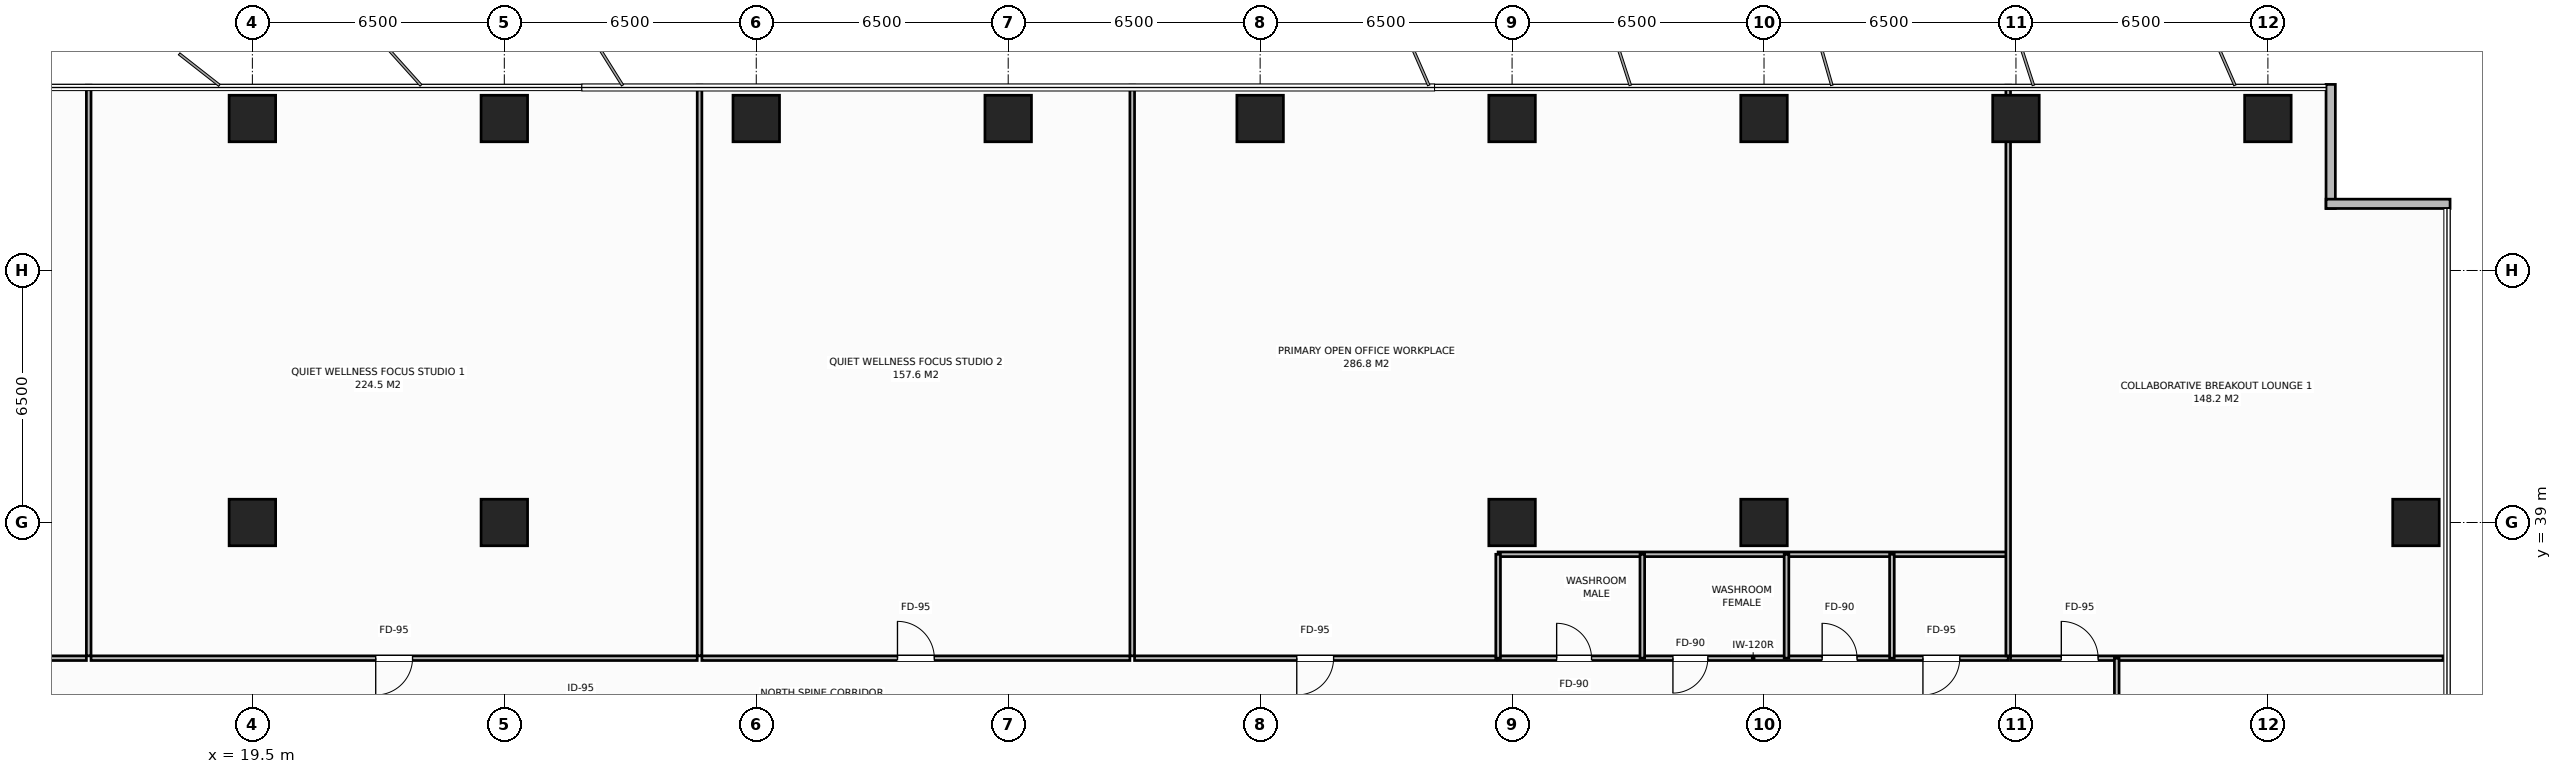
"""IFC4 building model, lengths in metres.
Left out: names, types, materials, properties, quantities, classifications, styles, units other than length and angle.
Written with IfcOpenShell. Run it as: python <this file> out.ifc"""

import sys

from ifc_helpers import new_model, si_unit, direction, frame, frame_2d, origin, origin_2d, place, context, subcontext, project, spatial, rectangle, extrude, element, fill, save


model = new_model("IFC4")
c1 = context("Model", 3, precision=1e-05, world=origin(), true_north=direction((0.0, 1.0)))
c2 = subcontext(c1, "Body", "Model", "MODEL_VIEW")
j1 = project(units=[si_unit("LENGTHUNIT", "METRE"), si_unit("PLANEANGLEUNIT", "RADIAN")], contexts=[c1])
p1 = place(None, origin())
s1 = spatial("IfcSite", under=j1, at=p1, CompositionType="ELEMENT")
p2 = place(p1, origin())
s2 = spatial("IfcBuilding", under=s1, at=p2, CompositionType="ELEMENT")
p3 = place(p2, frame((0.0, 0.0, 89.8)))
s3 = spatial("IfcBuildingStorey", under=s2, at=p3, CompositionType="ELEMENT", Elevation=89.8)
for number, where, z_axis, x_axis in (
    (1, (19.5, 39.0, 0.0), (0.0, 0.0, 1.0), (1.0, 0.0, 0.0)),
    (2, (58.5, 39.0, 0.0), (0.0, 0.0, 1.0), (1.0, 0.0, 0.0)),
    (3, (26.0, 39.0, 0.0), (0.0, 0.0, 1.0), (1.0, 0.0, 0.0)),
    (4, (52.0, 39.0, 0.0), (0.0, 0.0, 1.0), (1.0, 0.0, 0.0)),
    (5, (19.5, 49.42, 0.0), (0.0, 0.0, 1.0), (1.0, 0.0, 0.0)),
    (6, (26.0, 49.42, 0.0), (0.0, 0.0, 1.0), (1.0, 0.0, 0.0)),
    (7, (32.5, 49.42, 0.0), (0.0, 0.0, 1.0), (1.0, 0.0, 0.0)),
    (8, (39.0, 49.42, 0.0), (0.0, 0.0, 1.0), (1.0, 0.0, 0.0)),
    (9, (45.5, 49.42, 0.0), (0.0, 0.0, 1.0), (1.0, 0.0, 0.0)),
    (10, (52.0, 49.42, 0.0), (0.0, 0.0, 1.0), (1.0, 0.0, 0.0)),
    (11, (58.5, 49.42, 0.0), (0.0, 0.0, 1.0), (1.0, 0.0, 0.0)),
    (12, (65.0, 49.42, 0.0), (0.0, 0.0, 1.0), (1.0, 0.0, 0.0)),
    (13, (71.5, 49.42, 0.0), (0.0, 0.0, 1.0), (1.0, 0.0, 0.0)),
    (14, (75.32, 39.0, 0.0), (0.0, 0.0, 1.0), (1.0, 0.0, 0.0)),
):
    element("IfcColumn", number, at=place(p3, frame(where, z_axis=z_axis, x_axis=x_axis)), inside=s3, PredefinedType="COLUMN", context=c2, shape_type="SweptSolid", body=[
        extrude(rectangle(XDim=1.2, YDim=1.2, at=origin_2d()), origin(), (0.0, 0.0, 1.0), 3.8),
    ])
for number, where, z_axis, x_axis in (
    (15, (73.12, 50.3, 0.0), (0.0, 0.0, 1.0), (0.0, -1.0, 0.0)),
    (16, (73.0, 47.22, 0.0), (0.0, 0.0, 1.0), (1.0, 0.0, 0.0)),
):
    element("IfcWall", number, at=place(p3, frame(where, z_axis=z_axis, x_axis=x_axis)), inside=s3, PredefinedType="STANDARD", context=c2, shape_type="SweptSolid", body=[
        extrude(rectangle(XDim=3.2, YDim=0.24, at=frame_2d((1.6, 0.0))), origin(), (0.0, 0.0, 1.0), 3.565),
    ])
p4 = place(p3, frame((51.64, 35.5, 0.0), z_axis=(0.0, 0.0, 1.0), x_axis=(1.0, 0.0, 0.0)))
e17 = element("IfcWall", 17, at=p4, inside=s3, PredefinedType="PARTITIONING", context=c2, shape_type="SweptSolid", body=[
    extrude(rectangle(XDim=13.16, YDim=0.12, at=frame_2d((6.58, 0.0))), origin(), (0.0, 0.0, 1.0), 3.565),
])
p5 = place(p4, frame((1.51, 0.0, 0.0)))
e18 = element("IfcOpeningElement", 18, at=p5, cuts=e17, PredefinedType="OPENING", context=c2, shape_type="SweptSolid", body=[
    extrude(rectangle(XDim=0.9, YDim=2.15, at=frame_2d((0.45, 1.075))), frame((0.0, 0.07, 0.0), z_axis=(0.0, -1.0, 0.0), x_axis=(1.0, 0.0, 0.0)), (0.0, 0.0, 1.0), 0.14),
])
p6 = place(p4, frame((4.51, 0.0, 0.0)))
e19 = element("IfcOpeningElement", 19, at=p6, cuts=e17, PredefinedType="OPENING", context=c2, shape_type="SweptSolid", body=[
    extrude(rectangle(XDim=0.9, YDim=2.15, at=frame_2d((0.45, 1.075))), frame((0.0, 0.07, 0.0), z_axis=(0.0, -1.0, 0.0), x_axis=(1.0, 0.0, 0.0)), (0.0, 0.0, 1.0), 0.14),
])
p7 = place(p4, frame((8.36, 0.0, 0.0)))
e20 = element("IfcOpeningElement", 20, at=p7, cuts=e17, PredefinedType="OPENING", context=c2, shape_type="SweptSolid", body=[
    extrude(rectangle(XDim=0.9, YDim=2.15, at=frame_2d((0.45, 1.075))), frame((0.0, 0.07, 0.0), z_axis=(0.0, -1.0, 0.0), x_axis=(1.0, 0.0, 0.0)), (0.0, 0.0, 1.0), 0.14),
])
p8 = place(p4, frame((10.96, 0.0, 0.0)))
e21 = element("IfcOpeningElement", 21, at=p8, cuts=e17, PredefinedType="OPENING", context=c2, shape_type="SweptSolid", body=[
    extrude(rectangle(XDim=0.95, YDim=2.15, at=frame_2d((0.475, 1.075))), frame((0.0, 0.07, 0.0), z_axis=(0.0, -1.0, 0.0), x_axis=(1.0, 0.0, 0.0)), (0.0, 0.0, 1.0), 0.14),
])
p9 = place(p3, frame((51.64, 38.18, 0.0), z_axis=(0.0, 0.0, 1.0), x_axis=(1.0, 0.0, 0.0)))
e22 = element("IfcWall", 22, at=p9, inside=s3, PredefinedType="PARTITIONING", context=c2, shape_type="SweptSolid", body=[
    extrude(rectangle(XDim=13.16, YDim=0.12, at=frame_2d((6.58, 0.0))), origin(), (0.0, 0.0, 1.0), 3.565),
])
for number, where, z_axis, x_axis in (
    (23, (51.64, 35.5, 0.0), (0.0, 0.0, 1.0), (0.0, 1.0, 0.0)),
    (24, (55.36, 35.5, 0.0), (0.0, 0.0, 1.0), (0.0, 1.0, 0.0)),
    (25, (59.08, 35.5, 0.0), (0.0, 0.0, 1.0), (0.0, 1.0, 0.0)),
    (26, (61.8, 35.5, 0.0), (0.0, 0.0, 1.0), (0.0, 1.0, 0.0)),
):
    element("IfcWall", number, at=place(p3, frame(where, z_axis=z_axis, x_axis=x_axis)), inside=s3, PredefinedType="PARTITIONING", context=c2, shape_type="SweptSolid", body=[
        extrude(rectangle(XDim=2.68, YDim=0.12, at=frame_2d((1.34, 0.0))), origin(), (0.0, 0.0, 1.0), 3.565),
    ])
p10 = place(p3, frame((15.277, 35.56, 0.0), z_axis=(0.0, 0.0, 1.0), x_axis=(0.0, 1.0, 0.0)))
e27 = element("IfcWall", 27, at=p10, inside=s3, PredefinedType="PARTITIONING", context=c2, shape_type="SweptSolid", body=[
    extrude(rectangle(XDim=14.72, YDim=0.12, at=frame_2d((7.36, 0.0))), origin(), (0.0, 0.0, 1.0), 3.565),
])
p11 = place(p3, frame((1.98, 35.5, 0.0), z_axis=(0.0, 0.0, 1.0), x_axis=(1.0, 0.0, 0.0)))
e28 = element("IfcWall", 28, at=p11, inside=s3, PredefinedType="PARTITIONING", context=c2, shape_type="SweptSolid", body=[
    extrude(rectangle(XDim=13.237, YDim=0.12, at=frame_2d((6.619, 0.0))), origin(), (0.0, 0.0, 1.0), 3.565),
])
p12 = place(p11, frame((8.9, 0.0, 0.0)))
e29 = element("IfcOpeningElement", 29, at=p12, cuts=e28, PredefinedType="OPENING", context=c2, shape_type="SweptSolid", body=[
    extrude(rectangle(XDim=0.95, YDim=2.15, at=frame_2d((0.475, 1.075))), frame((0.0, 0.07, 0.0), z_axis=(0.0, -1.0, 0.0), x_axis=(1.0, 0.0, 0.0)), (0.0, 0.0, 1.0), 0.14),
])
p13 = place(p3, frame((31.037, 35.56, 0.0), z_axis=(0.0, 0.0, 1.0), x_axis=(0.0, 1.0, 0.0)))
e30 = element("IfcWall", 30, at=p13, inside=s3, PredefinedType="PARTITIONING", context=c2, shape_type="SweptSolid", body=[
    extrude(rectangle(XDim=14.72, YDim=0.12, at=frame_2d((7.36, 0.0))), origin(), (0.0, 0.0, 1.0), 3.565),
])
p14 = place(p3, frame((15.337, 35.5, 0.0), z_axis=(0.0, 0.0, 1.0), x_axis=(1.0, 0.0, 0.0)))
e31 = element("IfcWall", 31, at=p14, inside=s3, PredefinedType="PARTITIONING", context=c2, shape_type="SweptSolid", body=[
    extrude(rectangle(XDim=15.64, YDim=0.12, at=frame_2d((7.82, 0.0))), origin(), (0.0, 0.0, 1.0), 3.565),
])
p15 = place(p14, frame((7.345, 0.0, 0.0)))
e32 = element("IfcOpeningElement", 32, at=p15, cuts=e31, PredefinedType="OPENING", context=c2, shape_type="SweptSolid", body=[
    extrude(rectangle(XDim=0.95, YDim=2.15, at=frame_2d((0.475, 1.075))), frame((0.0, 0.07, 0.0), z_axis=(0.0, -1.0, 0.0), x_axis=(1.0, 0.0, 0.0)), (0.0, 0.0, 1.0), 0.14),
])
p16 = place(p3, frame((42.2, 35.56, 0.0), z_axis=(0.0, 0.0, 1.0), x_axis=(0.0, 1.0, 0.0)))
e33 = element("IfcWall", 33, at=p16, inside=s3, PredefinedType="PARTITIONING", context=c2, shape_type="SweptSolid", body=[
    extrude(rectangle(XDim=14.72, YDim=0.12, at=frame_2d((7.36, 0.0))), origin(), (0.0, 0.0, 1.0), 3.565),
])
p17 = place(p3, frame((31.097, 35.5, 0.0), z_axis=(0.0, 0.0, 1.0), x_axis=(1.0, 0.0, 0.0)))
e34 = element("IfcWall", 34, at=p17, inside=s3, PredefinedType="PARTITIONING", context=c2, shape_type="SweptSolid", body=[
    extrude(rectangle(XDim=11.043, YDim=0.12, at=frame_2d((5.521, 0.0))), origin(), (0.0, 0.0, 1.0), 3.565),
])
p18 = place(p17, frame((5.046, 0.0, 0.0)))
e35 = element("IfcOpeningElement", 35, at=p18, cuts=e34, PredefinedType="OPENING", context=c2, shape_type="SweptSolid", body=[
    extrude(rectangle(XDim=0.95, YDim=2.15, at=frame_2d((0.475, 1.075))), frame((0.0, 0.07, 0.0), z_axis=(0.0, -1.0, 0.0), x_axis=(1.0, 0.0, 0.0)), (0.0, 0.0, 1.0), 0.14),
])
p19 = place(p3, frame((64.8, 35.56, 0.0), z_axis=(0.0, 0.0, 1.0), x_axis=(0.0, 1.0, 0.0)))
e36 = element("IfcWall", 36, at=p19, inside=s3, PredefinedType="PARTITIONING", context=c2, shape_type="SweptSolid", body=[
    extrude(rectangle(XDim=14.72, YDim=0.12, at=frame_2d((7.36, 0.0))), origin(), (0.0, 0.0, 1.0), 2.965),
])
p20 = place(p3, frame((42.26, 35.5, 0.0), z_axis=(0.0, 0.0, 1.0), x_axis=(1.0, 0.0, 0.0)))
e37 = element("IfcWall", 37, at=p20, inside=s3, PredefinedType="PARTITIONING", context=c2, shape_type="SweptSolid", body=[
    extrude(rectangle(XDim=9.32, YDim=0.12, at=frame_2d((4.66, 0.0))), origin(), (0.0, 0.0, 1.0), 3.565),
])
p21 = place(p20, frame((4.185, 0.0, 0.0)))
e38 = element("IfcOpeningElement", 38, at=p21, cuts=e37, PredefinedType="OPENING", context=c2, shape_type="SweptSolid", body=[
    extrude(rectangle(XDim=0.95, YDim=2.15, at=frame_2d((0.475, 1.075))), frame((0.0, 0.07, 0.0), z_axis=(0.0, -1.0, 0.0), x_axis=(1.0, 0.0, 0.0)), (0.0, 0.0, 1.0), 0.14),
])
p22 = place(p3, frame((64.86, 35.5, 0.0), z_axis=(0.0, 0.0, 1.0), x_axis=(1.0, 0.0, 0.0)))
e39 = element("IfcWall", 39, at=p22, inside=s3, PredefinedType="PARTITIONING", context=c2, shape_type="SweptSolid", body=[
    extrude(rectangle(XDim=11.16, YDim=0.12, at=frame_2d((5.58, 0.0))), origin(), (0.0, 0.0, 1.0), 3.565),
])
p23 = place(p22, frame((1.31, 0.0, 0.0)))
e40 = element("IfcOpeningElement", 40, at=p23, cuts=e39, PredefinedType="OPENING", context=c2, shape_type="SweptSolid", body=[
    extrude(rectangle(XDim=0.95, YDim=2.15, at=frame_2d((0.475, 1.075))), frame((0.0, 0.07, 0.0), z_axis=(0.0, -1.0, 0.0), x_axis=(1.0, 0.0, 0.0)), (0.0, 0.0, 1.0), 0.14),
])
p24 = place(p3, frame((67.6, 16.5, 0.0), z_axis=(0.0, 0.0, 1.0), x_axis=(0.0, 1.0, 0.0)))
e41 = element("IfcWall", 41, at=p24, inside=s3, PredefinedType="PARTITIONING", context=c2, shape_type="SweptSolid", body=[
    extrude(rectangle(XDim=19.0, YDim=0.12, at=frame_2d((9.5, 0.0))), origin(), (0.0, 0.0, 1.0), 3.565),
])
p25 = place(p24, frame((9.025, 0.0, 0.0)))
e42 = element("IfcOpeningElement", 42, at=p25, cuts=e41, PredefinedType="OPENING", context=c2, shape_type="SweptSolid", body=[
    extrude(rectangle(XDim=0.95, YDim=2.15, at=frame_2d((0.475, 1.075))), frame((0.0, 0.07, 0.0), z_axis=(0.0, -1.0, 0.0), x_axis=(1.0, 0.0, 0.0)), (0.0, 0.0, 1.0), 0.14),
])
p26 = place(p5, origin())
e43 = element("IfcDoor", 43, at=p26, inside=s3, OperationType="SINGLE_SWING_LEFT", PredefinedType="DOOR", context=c2, shape_type="SweptSolid", body=[
    extrude(rectangle(XDim=0.9, YDim=2.15, at=frame_2d((0.45, 1.075))), frame((0.0, 0.025, 0.0), z_axis=(0.0, -1.0, 0.0), x_axis=(1.0, 0.0, 0.0)), (0.0, 0.0, 1.0), 0.05),
])
fill(e18, e43)
p27 = place(p6, origin())
e44 = element("IfcDoor", 44, at=p27, inside=s3, OperationType="SINGLE_SWING_RIGHT", PredefinedType="DOOR", context=c2, shape_type="SweptSolid", body=[
    extrude(rectangle(XDim=0.9, YDim=2.15, at=frame_2d((0.45, 1.075))), frame((0.0, 0.025, 0.0), z_axis=(0.0, -1.0, 0.0), x_axis=(1.0, 0.0, 0.0)), (0.0, 0.0, 1.0), 0.05),
])
fill(e19, e44)
p28 = place(p7, origin())
e45 = element("IfcDoor", 45, at=p28, inside=s3, OperationType="SINGLE_SWING_LEFT", PredefinedType="DOOR", context=c2, shape_type="SweptSolid", body=[
    extrude(rectangle(XDim=0.9, YDim=2.15, at=frame_2d((0.45, 1.075))), frame((0.0, 0.025, 0.0), z_axis=(0.0, -1.0, 0.0), x_axis=(1.0, 0.0, 0.0)), (0.0, 0.0, 1.0), 0.05),
])
fill(e20, e45)
p29 = place(p8, origin())
e46 = element("IfcDoor", 46, at=p29, inside=s3, OperationType="SINGLE_SWING_RIGHT", PredefinedType="DOOR", context=c2, shape_type="SweptSolid", body=[
    extrude(rectangle(XDim=0.95, YDim=2.15, at=frame_2d((0.475, 1.075))), frame((0.0, 0.025, 0.0), z_axis=(0.0, -1.0, 0.0), x_axis=(1.0, 0.0, 0.0)), (0.0, 0.0, 1.0), 0.05),
])
fill(e21, e46)
p30 = place(p15, origin())
e47 = element("IfcDoor", 47, at=p30, inside=s3, OperationType="SINGLE_SWING_RIGHT", PredefinedType="DOOR", context=c2, shape_type="SweptSolid", body=[
    extrude(rectangle(XDim=0.95, YDim=2.15, at=frame_2d((0.475, 1.075))), frame((0.0, 0.025, 0.0), z_axis=(0.0, -1.0, 0.0), x_axis=(1.0, 0.0, 0.0)), (0.0, 0.0, 1.0), 0.05),
])
fill(e32, e47)
p31 = place(p18, origin())
e48 = element("IfcDoor", 48, at=p31, inside=s3, OperationType="SINGLE_SWING_LEFT", PredefinedType="DOOR", context=c2, shape_type="SweptSolid", body=[
    extrude(rectangle(XDim=0.95, YDim=2.15, at=frame_2d((0.475, 1.075))), frame((0.0, 0.025, 0.0), z_axis=(0.0, -1.0, 0.0), x_axis=(1.0, 0.0, 0.0)), (0.0, 0.0, 1.0), 0.05),
])
fill(e35, e48)
p32 = place(p21, origin())
e49 = element("IfcDoor", 49, at=p32, inside=s3, OperationType="SINGLE_SWING_RIGHT", PredefinedType="DOOR", context=c2, shape_type="SweptSolid", body=[
    extrude(rectangle(XDim=0.95, YDim=2.15, at=frame_2d((0.475, 1.075))), frame((0.0, 0.025, 0.0), z_axis=(0.0, -1.0, 0.0), x_axis=(1.0, 0.0, 0.0)), (0.0, 0.0, 1.0), 0.05),
])
fill(e38, e49)
p33 = place(p23, origin())
e50 = element("IfcDoor", 50, at=p33, inside=s3, OperationType="SINGLE_SWING_LEFT", PredefinedType="DOOR", context=c2, shape_type="SweptSolid", body=[
    extrude(rectangle(XDim=0.95, YDim=2.15, at=frame_2d((0.475, 1.075))), frame((0.0, 0.025, 0.0), z_axis=(0.0, -1.0, 0.0), x_axis=(1.0, 0.0, 0.0)), (0.0, 0.0, 1.0), 0.05),
])
fill(e40, e50)
save(model, sys.argv[1])
